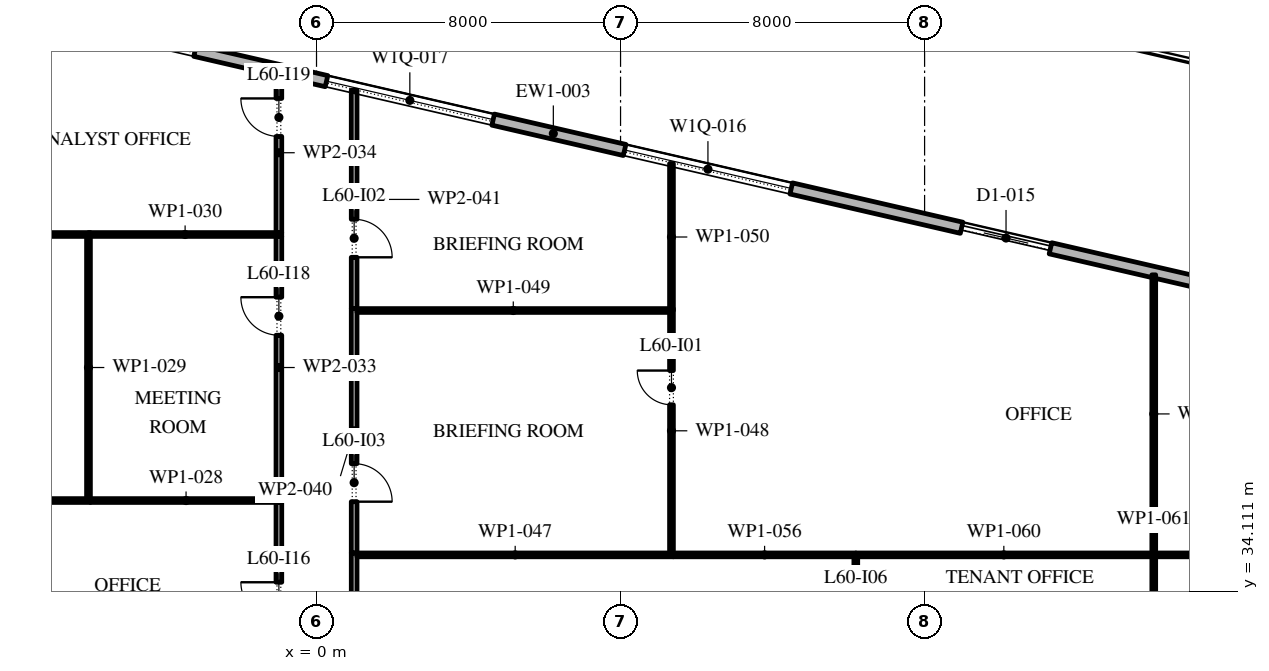
"""IFC4 building model, lengths in metres.
Left out: names, types, materials, properties, quantities, classifications, styles, units other than length and angle.
Written with IfcOpenShell. Run it as: python <this file> out.ifc"""

import sys

from ifc_helpers import new_model, si_unit, direction, frame, frame_2d, origin, place, context, subcontext, project, spatial, rectangle, extrude, element, fill, save


model = new_model("IFC4")
c1 = context("Model", 3, precision=1e-05, world=origin(), true_north=direction((0.0, 1.0)))
c2 = subcontext(c1, "Body", "Model", "MODEL_VIEW")
j1 = project(units=[si_unit("LENGTHUNIT", "METRE"), si_unit("PLANEANGLEUNIT", "RADIAN")], contexts=[c1])
p1 = place(None, origin())
s1 = spatial("IfcSite", under=j1, at=p1, CompositionType="ELEMENT")
p2 = place(p1, origin())
s2 = spatial("IfcBuilding", under=s1, at=p2, CompositionType="ELEMENT")
p3 = place(p2, frame((0.0, 0.0, 276.6)))
s3 = spatial("IfcBuildingStorey", under=s2, at=p3, CompositionType="ELEMENT", Elevation=276.6)
p4 = place(p3, frame((21.359, -11.678, 0.0), z_axis=(0.0, 0.0, 1.0), x_axis=(0.224949198343, 0.974370493275, 0.0)))
e1 = element("IfcWall", 1, at=p4, inside=s3, PredefinedType="STANDARD", context=c2, shape_type="SweptSolid", body=[
    extrude(rectangle(XDim=49.5, YDim=0.3, at=frame_2d((24.75, 0.0))), origin(), (0.0, 0.0, 1.0), 4.0),
])
p5 = place(p4, frame((1.157, 0.0, 0.45)))
e2 = element("IfcOpeningElement", 2, at=p5, cuts=e1, PredefinedType="OPENING", context=c2, shape_type="SweptSolid", body=[
    extrude(rectangle(XDim=4.5, YDim=3.05, at=frame_2d((2.25, 1.525))), frame((0.0, 0.16, 0.0), z_axis=(0.0, -1.0, 0.0), x_axis=(1.0, 0.0, 0.0)), (0.0, 0.0, 1.0), 0.32),
])
p6 = place(p4, frame((8.121, 0.0, 0.45)))
e3 = element("IfcOpeningElement", 3, at=p6, cuts=e1, PredefinedType="OPENING", context=c2, shape_type="SweptSolid", body=[
    extrude(rectangle(XDim=4.5, YDim=3.05, at=frame_2d((2.25, 1.525))), frame((0.0, 0.16, 0.0), z_axis=(0.0, -1.0, 0.0), x_axis=(1.0, 0.0, 0.0)), (0.0, 0.0, 1.0), 0.32),
])
p7 = place(p4, frame((15.236, 0.0, 0.45)))
e4 = element("IfcOpeningElement", 4, at=p7, cuts=e1, PredefinedType="OPENING", context=c2, shape_type="SweptSolid", body=[
    extrude(rectangle(XDim=4.5, YDim=3.05, at=frame_2d((2.25, 1.525))), frame((0.0, 0.16, 0.0), z_axis=(0.0, -1.0, 0.0), x_axis=(1.0, 0.0, 0.0)), (0.0, 0.0, 1.0), 0.32),
])
p8 = place(p4, frame((22.35, 0.0, 0.45)))
e5 = element("IfcOpeningElement", 5, at=p8, cuts=e1, PredefinedType="OPENING", context=c2, shape_type="SweptSolid", body=[
    extrude(rectangle(XDim=4.5, YDim=3.05, at=frame_2d((2.25, 1.525))), frame((0.0, 0.16, 0.0), z_axis=(0.0, -1.0, 0.0), x_axis=(1.0, 0.0, 0.0)), (0.0, 0.0, 1.0), 0.32),
])
p9 = place(p4, frame((29.464, 0.0, 0.45)))
e6 = element("IfcOpeningElement", 6, at=p9, cuts=e1, PredefinedType="OPENING", context=c2, shape_type="SweptSolid", body=[
    extrude(rectangle(XDim=4.5, YDim=2.95, at=frame_2d((2.25, 1.475))), frame((0.0, 0.16, 0.0), z_axis=(0.0, -1.0, 0.0), x_axis=(1.0, 0.0, 0.0)), (0.0, 0.0, 1.0), 0.32),
])
p10 = place(p4, frame((37.628, 0.0, 0.0)))
e7 = element("IfcOpeningElement", 7, at=p10, cuts=e1, PredefinedType="OPENING", context=c2, shape_type="SweptSolid", body=[
    extrude(rectangle(XDim=2.4, YDim=3.325, at=frame_2d((1.2, 1.663))), frame((0.0, 0.16, 0.0), z_axis=(0.0, -1.0, 0.0), x_axis=(1.0, 0.0, 0.0)), (0.0, 0.0, 1.0), 0.32),
])
p11 = place(p4, frame((43.693, 0.0, 0.45)))
e8 = element("IfcOpeningElement", 8, at=p11, cuts=e1, PredefinedType="OPENING", context=c2, shape_type="SweptSolid", body=[
    extrude(rectangle(XDim=4.5, YDim=3.05, at=frame_2d((2.25, 1.525))), frame((0.0, 0.16, 0.0), z_axis=(0.0, -1.0, 0.0), x_axis=(1.0, 0.0, 0.0)), (0.0, 0.0, 1.0), 0.32),
])
p12 = place(p3, frame((29.616, 40.758, 0.0), z_axis=(0.0, 0.0, 1.0), x_axis=(-0.974370532314, 0.224949029246, 0.0)))
e9 = element("IfcWall", 9, at=p12, inside=s3, PredefinedType="STANDARD", context=c2, shape_type="SweptSolid", body=[
    extrude(rectangle(XDim=48.0, YDim=0.3, at=frame_2d((24.0, 0.0))), origin(), (0.0, 0.0, 1.0), 4.0),
])
p13 = place(p12, frame((1.625, 0.0, 0.45)))
e10 = element("IfcOpeningElement", 10, at=p13, cuts=e9, PredefinedType="OPENING", context=c2, shape_type="SweptSolid", body=[
    extrude(rectangle(XDim=4.5, YDim=2.575, at=frame_2d((2.25, 1.288))), frame((0.0, 0.16, 0.0), z_axis=(0.0, -1.0, 0.0), x_axis=(1.0, 0.0, 0.0)), (0.0, 0.0, 1.0), 0.32),
])
p14 = place(p12, frame((10.575, 0.0, 0.0)))
e11 = element("IfcOpeningElement", 11, at=p14, cuts=e9, PredefinedType="OPENING", context=c2, shape_type="SweptSolid", body=[
    extrude(rectangle(XDim=2.4, YDim=3.5, at=frame_2d((1.2, 1.75))), frame((0.0, 0.16, 0.0), z_axis=(0.0, -1.0, 0.0), x_axis=(1.0, 0.0, 0.0)), (0.0, 0.0, 1.0), 0.32),
])
p15 = place(p12, frame((17.575, 0.0, 0.45)))
e12 = element("IfcOpeningElement", 12, at=p15, cuts=e9, PredefinedType="OPENING", context=c2, shape_type="SweptSolid", body=[
    extrude(rectangle(XDim=4.5, YDim=2.45, at=frame_2d((2.25, 1.225))), frame((0.0, 0.16, 0.0), z_axis=(0.0, -1.0, 0.0), x_axis=(1.0, 0.0, 0.0)), (0.0, 0.0, 1.0), 0.32),
])
p16 = place(p12, frame((25.625, 0.0, 0.45)))
e13 = element("IfcOpeningElement", 13, at=p16, cuts=e9, PredefinedType="OPENING", context=c2, shape_type="SweptSolid", body=[
    extrude(rectangle(XDim=4.5, YDim=2.45, at=frame_2d((2.25, 1.225))), frame((0.0, 0.16, 0.0), z_axis=(0.0, -1.0, 0.0), x_axis=(1.0, 0.0, 0.0)), (0.0, 0.0, 1.0), 0.32),
])
p17 = place(p12, frame((33.675, 0.0, 0.45)))
e14 = element("IfcOpeningElement", 14, at=p17, cuts=e9, PredefinedType="OPENING", context=c2, shape_type="SweptSolid", body=[
    extrude(rectangle(XDim=4.5, YDim=2.45, at=frame_2d((2.25, 1.225))), frame((0.0, 0.16, 0.0), z_axis=(0.0, -1.0, 0.0), x_axis=(1.0, 0.0, 0.0)), (0.0, 0.0, 1.0), 0.32),
])
p18 = place(p12, frame((42.175, 0.0, 0.0)))
e15 = element("IfcOpeningElement", 15, at=p18, cuts=e9, PredefinedType="OPENING", context=c2, shape_type="SweptSolid", body=[
    extrude(rectangle(XDim=2.4, YDim=3.5, at=frame_2d((1.2, 1.75))), frame((0.0, 0.16, 0.0), z_axis=(0.0, -1.0, 0.0), x_axis=(1.0, 0.0, 0.0)), (0.0, 0.0, 1.0), 0.32),
])
p19 = place(p3, frame((-14.14, 36.5, 0.0), z_axis=(0.0, 0.0, 1.0), x_axis=(1.0, 0.0, 0.0)))
e16 = element("IfcWall", 16, at=p19, inside=s3, PredefinedType="PARTITIONING", context=c2, shape_type="SweptSolid", body=[
    extrude(rectangle(XDim=8.19, YDim=0.1, at=frame_2d((4.095, 0.0))), origin(), (0.0, 0.0, 1.0), 4.0),
])
p20 = place(p19, frame((2.79, 0.0, 0.0)))
e17 = element("IfcOpeningElement", 17, at=p20, cuts=e16, PredefinedType="OPENING", context=c2, shape_type="SweptSolid", body=[
    extrude(rectangle(XDim=0.9, YDim=2.1, at=frame_2d((0.45, 1.05))), frame((0.0, 0.06, 0.0), z_axis=(0.0, -1.0, 0.0), x_axis=(1.0, 0.0, 0.0)), (0.0, 0.0, 1.0), 0.12),
])
p21 = place(p3, frame((-14.14, 43.5, 0.0), z_axis=(0.0, 0.0, 1.0), x_axis=(1.0, 0.0, 0.0)))
e18 = element("IfcWall", 18, at=p21, inside=s3, PredefinedType="PARTITIONING", context=c2, shape_type="SweptSolid", body=[
    extrude(rectangle(XDim=8.19, YDim=0.1, at=frame_2d((4.095, 0.0))), origin(), (0.0, 0.0, 1.0), 4.0),
])
p22 = place(p3, frame((-5.95, 36.5, 0.0), z_axis=(0.0, 0.0, 1.0), x_axis=(1.0, 0.0, 0.0)))
e19 = element("IfcWall", 19, at=p22, inside=s3, PredefinedType="PARTITIONING", context=c2, shape_type="SweptSolid", body=[
    extrude(rectangle(XDim=5.035, YDim=0.1, at=frame_2d((2.518, 0.0))), origin(), (0.0, 0.0, 1.0), 4.0),
])
p23 = place(p3, frame((-6.0, 43.45, 0.0), z_axis=(0.0, 0.0, 1.0), x_axis=(0.0, -1.0, 0.0)))
e20 = element("IfcWall", 20, at=p23, inside=s3, PredefinedType="PARTITIONING", context=c2, shape_type="SweptSolid", body=[
    extrude(rectangle(XDim=6.9, YDim=0.1, at=frame_2d((3.45, 0.0))), origin(), (0.0, 0.0, 1.0), 4.0),
])
p24 = place(p3, frame((-6.0, 43.5, 0.0), z_axis=(0.0, 0.0, 1.0), x_axis=(1.0, 0.0, 0.0)))
e21 = element("IfcWall", 21, at=p24, inside=s3, PredefinedType="PARTITIONING", context=c2, shape_type="SweptSolid", body=[
    extrude(rectangle(XDim=5.085, YDim=0.1, at=frame_2d((2.542, 0.0))), origin(), (0.0, 0.0, 1.0), 4.0),
])
p25 = place(p3, frame((-0.99, 29.71, 0.0), z_axis=(0.0, 0.0, 1.0), x_axis=(0.0, 1.0, 0.0)))
e22 = element("IfcWall", 22, at=p25, inside=s3, PredefinedType="PARTITIONING", context=c2, shape_type="SweptSolid", body=[
    extrude(rectangle(XDim=6.74, YDim=0.15, at=frame_2d((3.37, 0.0))), origin(), (0.0, 0.0, 1.0), 4.0),
])
p26 = place(p25, frame((3.64, 0.0, 0.0)))
e23 = element("IfcOpeningElement", 23, at=p26, cuts=e22, PredefinedType="OPENING", context=c2, shape_type="SweptSolid", body=[
    extrude(rectangle(XDim=1.0, YDim=2.1, at=frame_2d((0.5, 1.05))), frame((0.0, 0.085, 0.0), z_axis=(0.0, -1.0, 0.0), x_axis=(1.0, 0.0, 0.0)), (0.0, 0.0, 1.0), 0.17),
])
p27 = place(p3, frame((-0.99, 36.55, 0.0), z_axis=(0.0, 0.0, 1.0), x_axis=(0.0, 1.0, 0.0)))
e24 = element("IfcWall", 24, at=p27, inside=s3, PredefinedType="PARTITIONING", context=c2, shape_type="SweptSolid", body=[
    extrude(rectangle(XDim=6.9, YDim=0.15, at=frame_2d((3.45, 0.0))), origin(), (0.0, 0.0, 1.0), 4.0),
])
p28 = place(p27, frame((4.3, 0.0, 0.0)))
e25 = element("IfcOpeningElement", 25, at=p28, cuts=e24, PredefinedType="OPENING", context=c2, shape_type="SweptSolid", body=[
    extrude(rectangle(XDim=1.0, YDim=2.1, at=frame_2d((0.5, 1.05))), frame((0.0, 0.085, 0.0), z_axis=(0.0, -1.0, 0.0), x_axis=(1.0, 0.0, 0.0)), (0.0, 0.0, 1.0), 0.17),
])
p29 = place(p3, frame((-0.99, 43.55, 0.0), z_axis=(0.0, 0.0, 1.0), x_axis=(0.0, 1.0, 0.0)))
e26 = element("IfcWall", 26, at=p29, inside=s3, PredefinedType="PARTITIONING", context=c2, shape_type="SweptSolid", body=[
    extrude(rectangle(XDim=4.203, YDim=0.15, at=frame_2d((2.102, 0.0))), origin(), (0.0, 0.0, 1.0), 4.0),
])
p30 = place(p29, frame((2.53, 0.0, 0.0)))
e27 = element("IfcOpeningElement", 27, at=p30, cuts=e26, PredefinedType="OPENING", context=c2, shape_type="SweptSolid", body=[
    extrude(rectangle(XDim=1.0, YDim=2.1, at=frame_2d((0.5, 1.05))), frame((0.0, 0.085, 0.0), z_axis=(0.0, -1.0, 0.0), x_axis=(1.0, 0.0, 0.0)), (0.0, 0.0, 1.0), 0.17),
])
p31 = place(p3, frame((0.99, 35.12, 0.0), z_axis=(0.0, 0.0, 1.0), x_axis=(0.0, -1.0, 0.0)))
e28 = element("IfcWall", 28, at=p31, inside=s3, PredefinedType="PARTITIONING", context=c2, shape_type="SweptSolid", body=[
    extrude(rectangle(XDim=10.62, YDim=0.15, at=frame_2d((5.31, 0.0))), origin(), (0.0, 0.0, 1.0), 4.0),
])
p32 = place(p31, frame((4.72, 0.0, 0.0)))
e29 = element("IfcOpeningElement", 29, at=p32, cuts=e28, PredefinedType="OPENING", context=c2, shape_type="SweptSolid", body=[
    extrude(rectangle(XDim=1.0, YDim=2.1, at=frame_2d((0.5, 1.05))), frame((0.0, 0.085, 0.0), z_axis=(0.0, -1.0, 0.0), x_axis=(1.0, 0.0, 0.0)), (0.0, 0.0, 1.0), 0.17),
])
p33 = place(p3, frame((0.99, 41.55, 0.0), z_axis=(0.0, 0.0, 1.0), x_axis=(0.0, -1.0, 0.0)))
e30 = element("IfcWall", 30, at=p33, inside=s3, PredefinedType="PARTITIONING", context=c2, shape_type="SweptSolid", body=[
    extrude(rectangle(XDim=6.43, YDim=0.15, at=frame_2d((3.215, 0.0))), origin(), (0.0, 0.0, 1.0), 4.0),
])
p34 = place(p33, frame((4.08, 0.0, 0.0)))
e31 = element("IfcOpeningElement", 31, at=p34, cuts=e30, PredefinedType="OPENING", context=c2, shape_type="SweptSolid", body=[
    extrude(rectangle(XDim=1.0, YDim=2.1, at=frame_2d((0.5, 1.05))), frame((0.0, 0.085, 0.0), z_axis=(0.0, -1.0, 0.0), x_axis=(1.0, 0.0, 0.0)), (0.0, 0.0, 1.0), 0.17),
])
p35 = place(p3, frame((0.99, 47.296, 0.0), z_axis=(0.0, 0.0, 1.0), x_axis=(0.0, -1.0, 0.0)))
e32 = element("IfcWall", 32, at=p35, inside=s3, PredefinedType="PARTITIONING", context=c2, shape_type="SweptSolid", body=[
    extrude(rectangle(XDim=5.746, YDim=0.15, at=frame_2d((2.873, 0.0))), origin(), (0.0, 0.0, 1.0), 4.0),
])
p36 = place(p35, frame((3.396, 0.0, 0.0)))
e33 = element("IfcOpeningElement", 33, at=p36, cuts=e32, PredefinedType="OPENING", context=c2, shape_type="SweptSolid", body=[
    extrude(rectangle(XDim=1.0, YDim=2.1, at=frame_2d((0.5, 1.05))), frame((0.0, 0.085, 0.0), z_axis=(0.0, -1.0, 0.0), x_axis=(1.0, 0.0, 0.0)), (0.0, 0.0, 1.0), 0.17),
])
p37 = place(p3, frame((9.39, 35.07, 0.0), z_axis=(0.0, 0.0, 1.0), x_axis=(-1.0, 0.0, 0.0)))
e34 = element("IfcWall", 34, at=p37, inside=s3, PredefinedType="PARTITIONING", context=c2, shape_type="SweptSolid", body=[
    extrude(rectangle(XDim=8.325, YDim=0.1, at=frame_2d((4.163, 0.0))), origin(), (0.0, 0.0, 1.0), 4.0),
])
p38 = place(p3, frame((9.34, 35.12, 0.0), z_axis=(0.0, 0.0, 1.0), x_axis=(0.0, 1.0, 0.0)))
e35 = element("IfcWall", 35, at=p38, inside=s3, PredefinedType="PARTITIONING", context=c2, shape_type="SweptSolid", body=[
    extrude(rectangle(XDim=6.43, YDim=0.1, at=frame_2d((3.215, 0.0))), origin(), (0.0, 0.0, 1.0), 4.0),
])
p39 = place(p38, frame((3.9, 0.0, 0.0)))
e36 = element("IfcOpeningElement", 36, at=p39, cuts=e35, PredefinedType="OPENING", context=c2, shape_type="SweptSolid", body=[
    extrude(rectangle(XDim=0.9, YDim=2.1, at=frame_2d((0.45, 1.05))), frame((0.0, 0.06, 0.0), z_axis=(0.0, -1.0, 0.0), x_axis=(1.0, 0.0, 0.0)), (0.0, 0.0, 1.0), 0.12),
])
p40 = place(p3, frame((9.29, 41.5, 0.0), z_axis=(0.0, 0.0, 1.0), x_axis=(-1.0, 0.0, 0.0)))
e37 = element("IfcWall", 37, at=p40, inside=s3, PredefinedType="PARTITIONING", context=c2, shape_type="SweptSolid", body=[
    extrude(rectangle(XDim=8.225, YDim=0.1, at=frame_2d((4.113, 0.0))), origin(), (0.0, 0.0, 1.0), 4.0),
])
p41 = place(p3, frame((9.34, 41.5, 0.0), z_axis=(0.0, 0.0, 1.0), x_axis=(0.0, 1.0, 0.0)))
e38 = element("IfcWall", 38, at=p41, inside=s3, PredefinedType="PARTITIONING", context=c2, shape_type="SweptSolid", body=[
    extrude(rectangle(XDim=3.868, YDim=0.1, at=frame_2d((1.934, 0.0))), origin(), (0.0, 0.0, 1.0), 4.0),
])
p42 = place(p3, frame((14.19, 35.07, 0.0), z_axis=(0.0, 0.0, 1.0), x_axis=(-1.0, 0.0, 0.0)))
e39 = element("IfcWall", 39, at=p42, inside=s3, PredefinedType="PARTITIONING", context=c2, shape_type="SweptSolid", body=[
    extrude(rectangle(XDim=4.8, YDim=0.1, at=frame_2d((2.4, 0.0))), origin(), (0.0, 0.0, 1.0), 4.0),
])
p43 = place(p3, frame((14.19, 35.02, 0.0), z_axis=(0.0, 0.0, 1.0), x_axis=(0.0, -1.0, 0.0)))
e40 = element("IfcWall", 40, at=p43, inside=s3, PredefinedType="PARTITIONING", context=c2, shape_type="SweptSolid", body=[
    extrude(rectangle(XDim=4.32, YDim=0.1, at=frame_2d((2.16, 0.0))), origin(), (0.0, 0.0, 1.0), 4.0),
])
p44 = place(p43, frame((1.22, 0.0, 0.0)))
e41 = element("IfcOpeningElement", 41, at=p44, cuts=e40, PredefinedType="OPENING", context=c2, shape_type="SweptSolid", body=[
    extrude(rectangle(XDim=0.9, YDim=2.1, at=frame_2d((0.45, 1.05))), frame((0.0, 0.06, 0.0), z_axis=(0.0, -1.0, 0.0), x_axis=(1.0, 0.0, 0.0)), (0.0, 0.0, 1.0), 0.12),
])
p45 = place(p3, frame((21.98, 35.07, 0.0), z_axis=(0.0, 0.0, 1.0), x_axis=(-1.0, 0.0, 0.0)))
e42 = element("IfcWall", 42, at=p45, inside=s3, PredefinedType="PARTITIONING", context=c2, shape_type="SweptSolid", body=[
    extrude(rectangle(XDim=7.79, YDim=0.1, at=frame_2d((3.895, 0.0))), origin(), (0.0, 0.0, 1.0), 4.0),
])
p46 = place(p3, frame((22.03, 35.02, 0.0), z_axis=(0.0, 0.0, 1.0), x_axis=(0.0, -1.0, 0.0)))
e43 = element("IfcWall", 43, at=p46, inside=s3, PredefinedType="PARTITIONING", context=c2, shape_type="SweptSolid", body=[
    extrude(rectangle(XDim=2.445, YDim=0.1, at=frame_2d((1.223, 0.0))), origin(), (0.0, 0.0, 1.0), 4.0),
])
p47 = place(p3, frame((21.98, 35.07, 0.0), z_axis=(0.0, 0.0, 1.0), x_axis=(1.0, 0.0, 0.0)))
e44 = element("IfcWall", 44, at=p47, inside=s3, PredefinedType="PARTITIONING", context=c2, shape_type="SweptSolid", body=[
    extrude(rectangle(XDim=8.55, YDim=0.1, at=frame_2d((4.275, 0.0))), origin(), (0.0, 0.0, 1.0), 4.0),
])
p48 = place(p47, frame((2.15, 0.0, 0.0)))
e45 = element("IfcOpeningElement", 45, at=p48, cuts=e44, PredefinedType="OPENING", context=c2, shape_type="SweptSolid", body=[
    extrude(rectangle(XDim=0.9, YDim=2.1, at=frame_2d((0.45, 1.05))), frame((0.0, 0.06, 0.0), z_axis=(0.0, -1.0, 0.0), x_axis=(1.0, 0.0, 0.0)), (0.0, 0.0, 1.0), 0.12),
])
p49 = place(p3, frame((22.03, 42.438, 0.0), z_axis=(0.0, 0.0, 1.0), x_axis=(0.0, -1.0, 0.0)))
e46 = element("IfcWall", 46, at=p49, inside=s3, PredefinedType="PARTITIONING", context=c2, shape_type="SweptSolid", body=[
    extrude(rectangle(XDim=7.318, YDim=0.1, at=frame_2d((3.659, 0.0))), origin(), (0.0, 0.0, 1.0), 4.0),
])
p50 = place(p14, origin())
e47 = element("IfcDoor", 47, at=p50, inside=s3, OperationType="DOUBLE_DOOR_SLIDING", PredefinedType="DOOR", context=c2, shape_type="SweptSolid", body=[
    extrude(rectangle(XDim=2.4, YDim=3.5, at=frame_2d((1.2, 1.75))), frame((0.0, 0.025, 0.0), z_axis=(0.0, -1.0, 0.0), x_axis=(1.0, 0.0, 0.0)), (0.0, 0.0, 1.0), 0.05),
])
fill(e11, e47)
p51 = place(p15, origin())
e48 = element("IfcWindow", 48, at=p51, inside=s3, PartitioningType="DOUBLE_PANEL_VERTICAL", PredefinedType="WINDOW", context=c2, shape_type="SweptSolid", body=[
    extrude(rectangle(XDim=4.5, YDim=2.45, at=frame_2d((2.25, 1.225))), frame((0.0, 0.03, 0.0), z_axis=(0.0, -1.0, 0.0), x_axis=(1.0, 0.0, 0.0)), (0.0, 0.0, 1.0), 0.06),
])
fill(e12, e48)
p52 = place(p16, origin())
e49 = element("IfcWindow", 49, at=p52, inside=s3, PartitioningType="DOUBLE_PANEL_VERTICAL", PredefinedType="WINDOW", context=c2, shape_type="SweptSolid", body=[
    extrude(rectangle(XDim=4.5, YDim=2.45, at=frame_2d((2.25, 1.225))), frame((0.0, 0.03, 0.0), z_axis=(0.0, -1.0, 0.0), x_axis=(1.0, 0.0, 0.0)), (0.0, 0.0, 1.0), 0.06),
])
fill(e13, e49)
p53 = place(p39, origin())
e50 = element("IfcDoor", 50, at=p53, inside=s3, OperationType="SINGLE_SWING_LEFT", PredefinedType="DOOR", context=c2, shape_type="SweptSolid", body=[
    extrude(rectangle(XDim=0.9, YDim=2.1, at=frame_2d((0.45, 1.05))), frame((0.0, 0.025, 0.0), z_axis=(0.0, -1.0, 0.0), x_axis=(1.0, 0.0, 0.0)), (0.0, 0.0, 1.0), 0.05),
])
fill(e36, e50)
p54 = place(p36, origin())
e51 = element("IfcDoor", 51, at=p54, inside=s3, OperationType="SINGLE_SWING_LEFT", PredefinedType="DOOR", context=c2, shape_type="SweptSolid", body=[
    extrude(rectangle(XDim=1.0, YDim=2.1, at=frame_2d((0.5, 1.05))), frame((0.0, 0.025, 0.0), z_axis=(0.0, -1.0, 0.0), x_axis=(1.0, 0.0, 0.0)), (0.0, 0.0, 1.0), 0.05),
])
fill(e33, e51)
p55 = place(p34, origin())
e52 = element("IfcDoor", 52, at=p55, inside=s3, OperationType="SINGLE_SWING_LEFT", PredefinedType="DOOR", context=c2, shape_type="SweptSolid", body=[
    extrude(rectangle(XDim=1.0, YDim=2.1, at=frame_2d((0.5, 1.05))), frame((0.0, 0.025, 0.0), z_axis=(0.0, -1.0, 0.0), x_axis=(1.0, 0.0, 0.0)), (0.0, 0.0, 1.0), 0.05),
])
fill(e31, e52)
p56 = place(p26, origin())
e53 = element("IfcDoor", 53, at=p56, inside=s3, OperationType="SINGLE_SWING_LEFT", PredefinedType="DOOR", context=c2, shape_type="SweptSolid", body=[
    extrude(rectangle(XDim=1.0, YDim=2.1, at=frame_2d((0.5, 1.05))), frame((0.0, 0.025, 0.0), z_axis=(0.0, -1.0, 0.0), x_axis=(1.0, 0.0, 0.0)), (0.0, 0.0, 1.0), 0.05),
])
fill(e23, e53)
p57 = place(p28, origin())
e54 = element("IfcDoor", 54, at=p57, inside=s3, OperationType="SINGLE_SWING_LEFT", PredefinedType="DOOR", context=c2, shape_type="SweptSolid", body=[
    extrude(rectangle(XDim=1.0, YDim=2.1, at=frame_2d((0.5, 1.05))), frame((0.0, 0.025, 0.0), z_axis=(0.0, -1.0, 0.0), x_axis=(1.0, 0.0, 0.0)), (0.0, 0.0, 1.0), 0.05),
])
fill(e25, e54)
p58 = place(p30, origin())
e55 = element("IfcDoor", 55, at=p58, inside=s3, OperationType="SINGLE_SWING_LEFT", PredefinedType="DOOR", context=c2, shape_type="SweptSolid", body=[
    extrude(rectangle(XDim=1.0, YDim=2.1, at=frame_2d((0.5, 1.05))), frame((0.0, 0.025, 0.0), z_axis=(0.0, -1.0, 0.0), x_axis=(1.0, 0.0, 0.0)), (0.0, 0.0, 1.0), 0.05),
])
fill(e27, e55)
save(model, sys.argv[1])
